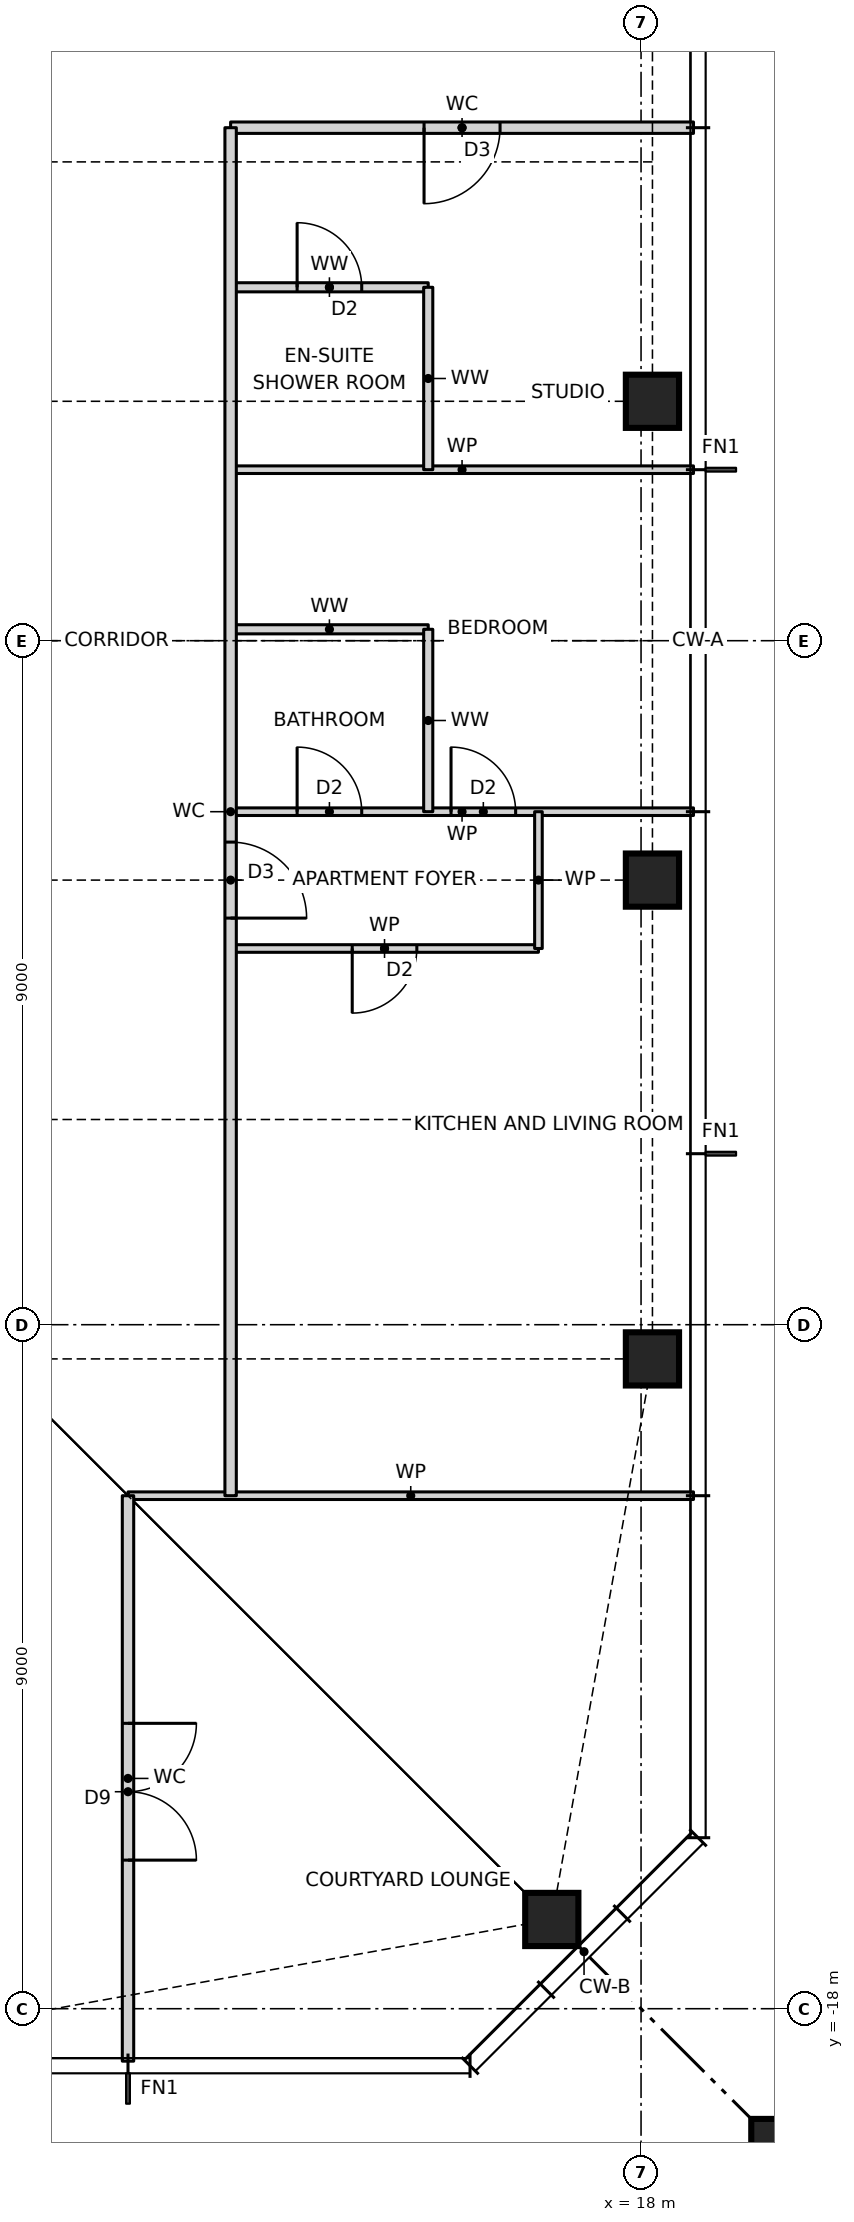
"""IFC4 building model, lengths in metres.
Left out: names, types, materials, properties, quantities, classifications, styles, units other than length and angle.
Written with IfcOpenShell. Run it as: python <this file> out.ifc"""

import sys

from ifc_helpers import new_model, si_unit, direction, frame, frame_2d, origin, origin_2d, place, context, subcontext, project, spatial, rectangle, hollow_rectangle, i_section, extrude, element, fill, save


model = new_model("IFC4")
c1 = context("Model", 3, precision=1e-05, world=origin(), true_north=direction((0.0, 1.0)))
c2 = subcontext(c1, "Body", "Model", "MODEL_VIEW")
j1 = project(units=[si_unit("LENGTHUNIT", "METRE"), si_unit("PLANEANGLEUNIT", "RADIAN")], contexts=[c1])
p1 = place(None, origin())
s1 = spatial("IfcSite", under=j1, at=p1, CompositionType="ELEMENT")
p2 = place(p1, origin())
s2 = spatial("IfcBuilding", under=s1, at=p2, CompositionType="ELEMENT")
p3 = place(p2, frame((0.0, 0.0, 163.5)))
s3 = spatial("IfcBuildingStorey", under=s2, at=p3, CompositionType="ELEMENT", Elevation=163.5)
for number, where, z_axis, x_axis in (
    (1, (16.826, -16.826, 0.0), (0.0, 0.0, 1.0), (1.0, 0.0, 0.0)),
    (2, (18.15, -9.45, 0.0), (0.0, 0.0, 1.0), (1.0, 0.0, 0.0)),
    (3, (18.15, -3.15, 0.0), (0.0, 0.0, 1.0), (1.0, 0.0, 0.0)),
    (4, (18.15, 3.15, 0.0), (0.0, 0.0, 1.0), (1.0, 0.0, 0.0)),
):
    element("IfcColumn", number, at=place(p3, frame(where, z_axis=z_axis, x_axis=x_axis)), inside=s3, PredefinedType="COLUMN", context=c2, shape_type="SweptSolid", body=[
        extrude(hollow_rectangle(XDim=0.7, YDim=0.7, WallThickness=0.06, at=origin_2d()), origin(), (0.0, 0.0, 1.0), 3.5),
    ])
p4 = place(p3, frame((21.65, -21.65, 0.0), z_axis=(0.0, 0.0, 1.0), x_axis=(1.0, 0.0, 0.0)))
e5 = element("IfcColumn", 5, at=p4, inside=s3, PredefinedType="COLUMN", context=c2, shape_type="SweptSolid", body=[
    extrude(rectangle(XDim=4.4, YDim=4.4, at=origin_2d()), origin(), (0.0, 0.0, 1.0), 3.5),
    extrude(i_section(OverallWidth=0.478, OverallDepth=0.599, WebThickness=0.1, FlangeThickness=0.14, at=origin_2d()), origin(), (0.0, 0.0, 1.0), 3.5),
])
p5 = place(p3, frame((11.25, -11.25, 0.0), z_axis=(0.0, 0.0, 1.0), x_axis=(1.0, 0.0, 0.0)))
e6 = element("IfcWall", 6, at=p5, inside=s3, PredefinedType="PARTITIONING", context=c2, shape_type="SweptSolid", body=[
    extrude(rectangle(XDim=7.44, YDim=0.1, at=frame_2d((3.72, 0.0))), origin(), (0.0, 0.0, 1.0), 3.27),
])
p6 = place(p3, frame((12.6, -4.05, 0.0), z_axis=(0.0, 0.0, 1.0), x_axis=(1.0, 0.0, 0.0)))
e7 = element("IfcWall", 7, at=p6, inside=s3, PredefinedType="PARTITIONING", context=c2, shape_type="SweptSolid", body=[
    extrude(rectangle(XDim=4.05, YDim=0.1, at=frame_2d((2.025, 0.0))), origin(), (0.0, 0.0, 1.0), 3.27),
])
p7 = place(p6, frame((1.6, 0.0, 0.0)))
e8 = element("IfcOpeningElement", 8, at=p7, cuts=e7, PredefinedType="OPENING", context=c2, shape_type="SweptSolid", body=[
    extrude(rectangle(XDim=0.85, YDim=2.1, at=frame_2d((0.425, 1.05))), frame((0.0, 0.06, 0.0), z_axis=(0.0, -1.0, 0.0), x_axis=(1.0, 0.0, 0.0)), (0.0, 0.0, 1.0), 0.12),
])
p8 = place(p3, frame((12.6, -2.25, 0.0), z_axis=(0.0, 0.0, 1.0), x_axis=(1.0, 0.0, 0.0)))
e9 = element("IfcWall", 9, at=p8, inside=s3, PredefinedType="PARTITIONING", context=c2, shape_type="SweptSolid", body=[
    extrude(rectangle(XDim=6.09, YDim=0.1, at=frame_2d((3.045, 0.0))), origin(), (0.0, 0.0, 1.0), 3.27),
])
p9 = place(p8, frame((2.9, 0.0, 0.0)))
e10 = element("IfcOpeningElement", 10, at=p9, cuts=e9, PredefinedType="OPENING", context=c2, shape_type="SweptSolid", body=[
    extrude(rectangle(XDim=0.85, YDim=2.1, at=frame_2d((0.425, 1.05))), frame((0.0, 0.06, 0.0), z_axis=(0.0, -1.0, 0.0), x_axis=(1.0, 0.0, 0.0)), (0.0, 0.0, 1.0), 0.12),
])
p10 = place(p8, frame((0.875, 0.0, 0.0)))
e11 = element("IfcOpeningElement", 11, at=p10, cuts=e9, PredefinedType="OPENING", context=c2, shape_type="SweptSolid", body=[
    extrude(rectangle(XDim=0.85, YDim=2.1, at=frame_2d((0.425, 1.05))), frame((0.0, 0.06, 0.0), z_axis=(0.0, -1.0, 0.0), x_axis=(1.0, 0.0, 0.0)), (0.0, 0.0, 1.0), 0.12),
])
p11 = place(p3, frame((12.6, 0.15, 0.0), z_axis=(0.0, 0.0, 1.0), x_axis=(1.0, 0.0, 0.0)))
e12 = element("IfcWall", 12, at=p11, inside=s3, PredefinedType="PARTITIONING", context=c2, shape_type="SweptSolid", body=[
    extrude(rectangle(XDim=2.6, YDim=0.12, at=frame_2d((1.3, 0.0))), origin(), (0.0, 0.0, 1.0), 3.27),
])
p12 = place(p3, frame((12.6, 2.25, 0.0), z_axis=(0.0, 0.0, 1.0), x_axis=(1.0, 0.0, 0.0)))
e13 = element("IfcWall", 13, at=p12, inside=s3, PredefinedType="PARTITIONING", context=c2, shape_type="SweptSolid", body=[
    extrude(rectangle(XDim=6.09, YDim=0.1, at=frame_2d((3.045, 0.0))), origin(), (0.0, 0.0, 1.0), 3.27),
])
p13 = place(p3, frame((12.6, 4.65, 0.0), z_axis=(0.0, 0.0, 1.0), x_axis=(1.0, 0.0, 0.0)))
e14 = element("IfcWall", 14, at=p13, inside=s3, PredefinedType="PARTITIONING", context=c2, shape_type="SweptSolid", body=[
    extrude(rectangle(XDim=2.6, YDim=0.12, at=frame_2d((1.3, 0.0))), origin(), (0.0, 0.0, 1.0), 3.27),
])
p14 = place(p13, frame((0.875, 0.0, 0.0)))
e15 = element("IfcOpeningElement", 15, at=p14, cuts=e14, PredefinedType="OPENING", context=c2, shape_type="SweptSolid", body=[
    extrude(rectangle(XDim=0.85, YDim=2.1, at=frame_2d((0.425, 1.05))), frame((0.0, 0.07, 0.0), z_axis=(0.0, -1.0, 0.0), x_axis=(1.0, 0.0, 0.0)), (0.0, 0.0, 1.0), 0.14),
])
p15 = place(p3, frame((12.6, 6.75, 0.0), z_axis=(0.0, 0.0, 1.0), x_axis=(1.0, 0.0, 0.0)))
e16 = element("IfcWall", 16, at=p15, inside=s3, PredefinedType="PARTITIONING", context=c2, shape_type="SweptSolid", body=[
    extrude(rectangle(XDim=6.09, YDim=0.15, at=frame_2d((3.045, 0.0))), origin(), (0.0, 0.0, 1.0), 3.27),
])
p16 = place(p15, frame((2.545, 0.0, 0.0)))
e17 = element("IfcOpeningElement", 17, at=p16, cuts=e16, PredefinedType="OPENING", context=c2, shape_type="SweptSolid", body=[
    extrude(rectangle(XDim=1.0, YDim=2.1, at=frame_2d((0.5, 1.05))), frame((0.0, 0.085, 0.0), z_axis=(0.0, -1.0, 0.0), x_axis=(1.0, 0.0, 0.0)), (0.0, 0.0, 1.0), 0.17),
])
p17 = place(p3, frame((16.65, -4.05, 0.0), z_axis=(0.0, 0.0, 1.0), x_axis=(0.0, 1.0, 0.0)))
e18 = element("IfcWall", 18, at=p17, inside=s3, PredefinedType="PARTITIONING", context=c2, shape_type="SweptSolid", body=[
    extrude(rectangle(XDim=1.8, YDim=0.1, at=frame_2d((0.9, 0.0))), origin(), (0.0, 0.0, 1.0), 3.27),
])
for number, where, z_axis, x_axis in (
    (19, (15.2, -2.25, 0.0), (0.0, 0.0, 1.0), (0.0, 1.0, 0.0)),
    (20, (15.2, 2.25, 0.0), (0.0, 0.0, 1.0), (0.0, 1.0, 0.0)),
):
    element("IfcWall", number, at=place(p3, frame(where, z_axis=z_axis, x_axis=x_axis)), inside=s3, PredefinedType="PARTITIONING", context=c2, shape_type="SweptSolid", body=[
        extrude(rectangle(XDim=2.4, YDim=0.12, at=frame_2d((1.2, 0.0))), origin(), (0.0, 0.0, 1.0), 3.27),
    ])
p18 = place(p3, frame((12.6, -11.25, 0.0), z_axis=(0.0, 0.0, 1.0), x_axis=(0.0, 1.0, 0.0)))
e21 = element("IfcWall", 21, at=p18, inside=s3, PredefinedType="PARTITIONING", context=c2, shape_type="SweptSolid", body=[
    extrude(rectangle(XDim=18.0, YDim=0.15, at=frame_2d((9.0, 0.0))), origin(), (0.0, 0.0, 1.0), 3.27),
])
p19 = place(p18, frame((7.6, 0.0, 0.0)))
e22 = element("IfcOpeningElement", 22, at=p19, cuts=e21, PredefinedType="OPENING", context=c2, shape_type="SweptSolid", body=[
    extrude(rectangle(XDim=1.0, YDim=2.1, at=frame_2d((0.5, 1.05))), frame((0.0, 0.085, 0.0), z_axis=(0.0, -1.0, 0.0), x_axis=(1.0, 0.0, 0.0)), (0.0, 0.0, 1.0), 0.17),
])
p20 = place(p3, frame((11.25, -18.69, 0.0), z_axis=(0.0, 0.0, 1.0), x_axis=(0.0, 1.0, 0.0)))
e23 = element("IfcWall", 23, at=p20, inside=s3, PredefinedType="PARTITIONING", context=c2, shape_type="SweptSolid", body=[
    extrude(rectangle(XDim=7.44, YDim=0.15, at=frame_2d((3.72, 0.0))), origin(), (0.0, 0.0, 1.0), 3.27),
])
p21 = place(p20, frame((2.645, 0.0, 0.0)))
e24 = element("IfcOpeningElement", 24, at=p21, cuts=e23, PredefinedType="OPENING", context=c2, shape_type="SweptSolid", body=[
    extrude(rectangle(XDim=1.8, YDim=2.1, at=frame_2d((0.9, 1.05))), frame((0.0, 0.085, 0.0), z_axis=(0.0, -1.0, 0.0), x_axis=(1.0, 0.0, 0.0)), (0.0, 0.0, 1.0), 0.17),
])
p22 = place(p19, frame((1.0, 0.0, 0.0), z_axis=(0.0, 0.0, 1.0), x_axis=(-1.0, 0.0, 0.0)))
e25 = element("IfcDoor", 25, at=p22, inside=s3, OperationType="SINGLE_SWING_RIGHT", PredefinedType="DOOR", context=c2, shape_type="SweptSolid", body=[
    extrude(rectangle(XDim=1.0, YDim=2.1, at=frame_2d((0.5, 1.05))), frame((0.0, 0.025, 0.0), z_axis=(0.0, -1.0, 0.0), x_axis=(1.0, 0.0, 0.0)), (0.0, 0.0, 1.0), 0.05),
])
fill(e22, e25)
p23 = place(p7, frame((0.85, 0.0, 0.0), z_axis=(0.0, 0.0, 1.0), x_axis=(-1.0, 0.0, 0.0)))
e26 = element("IfcDoor", 26, at=p23, inside=s3, OperationType="SINGLE_SWING_RIGHT", PredefinedType="DOOR", context=c2, shape_type="SweptSolid", body=[
    extrude(rectangle(XDim=0.85, YDim=2.1, at=frame_2d((0.425, 1.05))), frame((0.0, 0.025, 0.0), z_axis=(0.0, -1.0, 0.0), x_axis=(1.0, 0.0, 0.0)), (0.0, 0.0, 1.0), 0.05),
])
fill(e8, e26)
p24 = place(p9, origin())
e27 = element("IfcDoor", 27, at=p24, inside=s3, OperationType="SINGLE_SWING_LEFT", PredefinedType="DOOR", context=c2, shape_type="SweptSolid", body=[
    extrude(rectangle(XDim=0.85, YDim=2.1, at=frame_2d((0.425, 1.05))), frame((0.0, 0.025, 0.0), z_axis=(0.0, -1.0, 0.0), x_axis=(1.0, 0.0, 0.0)), (0.0, 0.0, 1.0), 0.05),
])
fill(e10, e27)
p25 = place(p10, origin())
e28 = element("IfcDoor", 28, at=p25, inside=s3, OperationType="SINGLE_SWING_LEFT", PredefinedType="DOOR", context=c2, shape_type="SweptSolid", body=[
    extrude(rectangle(XDim=0.85, YDim=2.1, at=frame_2d((0.425, 1.05))), frame((0.0, 0.025, 0.0), z_axis=(0.0, -1.0, 0.0), x_axis=(1.0, 0.0, 0.0)), (0.0, 0.0, 1.0), 0.05),
])
fill(e11, e28)
p26 = place(p16, frame((1.0, 0.0, 0.0), z_axis=(0.0, 0.0, 1.0), x_axis=(-1.0, 0.0, 0.0)))
e29 = element("IfcDoor", 29, at=p26, inside=s3, OperationType="SINGLE_SWING_RIGHT", PredefinedType="DOOR", context=c2, shape_type="SweptSolid", body=[
    extrude(rectangle(XDim=1.0, YDim=2.1, at=frame_2d((0.5, 1.05))), frame((0.0, 0.025, 0.0), z_axis=(0.0, -1.0, 0.0), x_axis=(1.0, 0.0, 0.0)), (0.0, 0.0, 1.0), 0.05),
])
fill(e17, e29)
p27 = place(p14, origin())
e30 = element("IfcDoor", 30, at=p27, inside=s3, OperationType="SINGLE_SWING_LEFT", PredefinedType="DOOR", context=c2, shape_type="SweptSolid", body=[
    extrude(rectangle(XDim=0.85, YDim=2.1, at=frame_2d((0.425, 1.05))), frame((0.0, 0.025, 0.0), z_axis=(0.0, -1.0, 0.0), x_axis=(1.0, 0.0, 0.0)), (0.0, 0.0, 1.0), 0.05),
])
fill(e15, e30)
p28 = place(p21, frame((1.8, 0.0, 0.0), z_axis=(0.0, 0.0, 1.0), x_axis=(-1.0, 0.0, 0.0)))
e31 = element("IfcDoor", 31, at=p28, inside=s3, OperationType="DOUBLE_DOOR_SINGLE_SWING", PredefinedType="DOOR", context=c2, shape_type="SweptSolid", body=[
    extrude(rectangle(XDim=1.8, YDim=2.1, at=frame_2d((0.9, 1.05))), frame((0.0, 0.025, 0.0), z_axis=(0.0, -1.0, 0.0), x_axis=(1.0, 0.0, 0.0)), (0.0, 0.0, 1.0), 0.05),
])
fill(e24, e31)
save(model, sys.argv[1])
